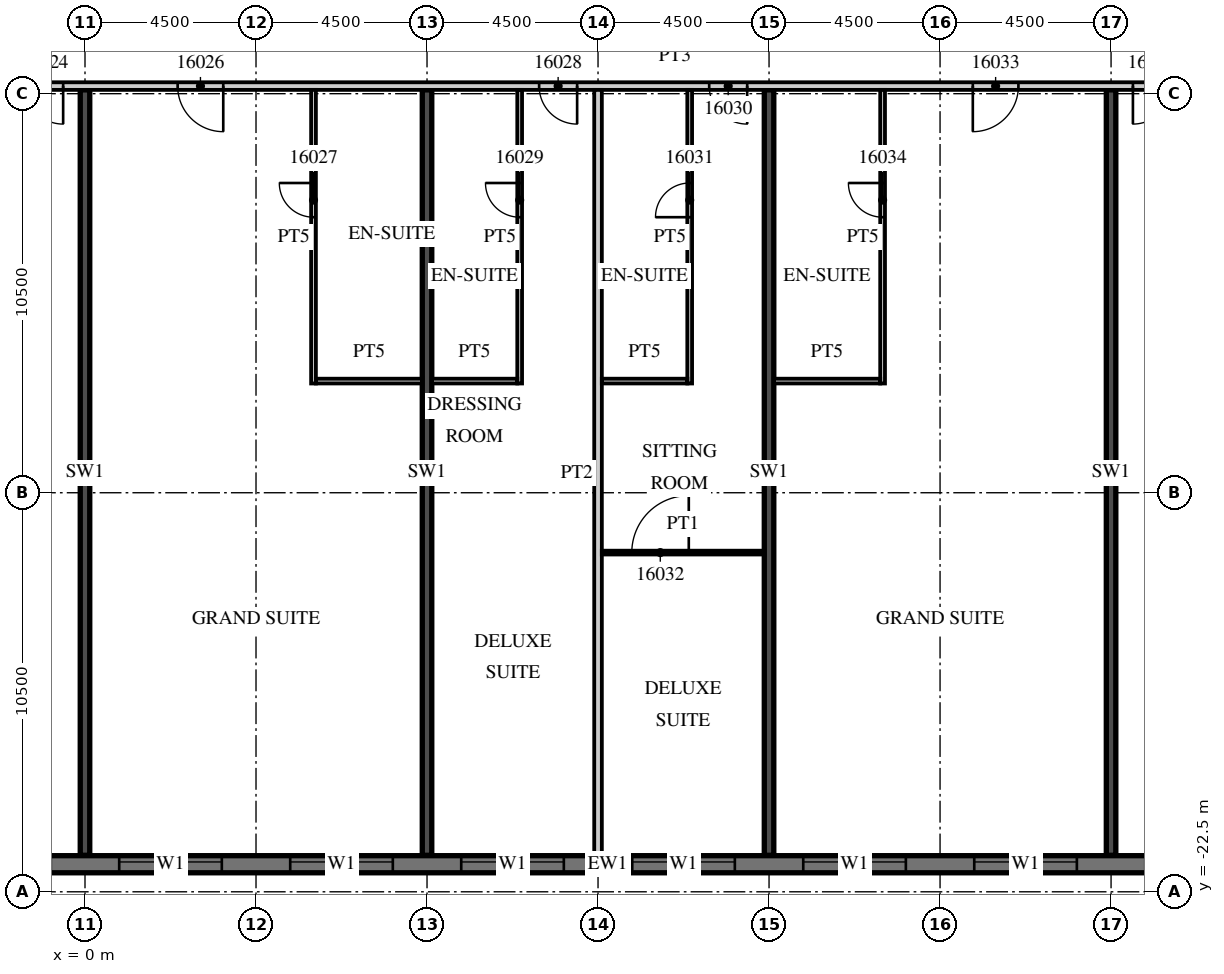
"""IFC4 building model, lengths in metres.
Left out: names, types, materials, properties, quantities, classifications, styles, units other than length and angle.
Written with IfcOpenShell. Run it as: python <this file> out.ifc"""

import sys

from ifc_helpers import new_model, si_unit, direction, frame, frame_2d, origin, place, context, subcontext, project, spatial, rectangle, extrude, element, fill, save


model = new_model("IFC4")
c1 = context("Model", 3, precision=1e-05, world=origin(), true_north=direction((0.0, 1.0)))
c2 = subcontext(c1, "Body", "Model", "MODEL_VIEW")
j1 = project(units=[si_unit("LENGTHUNIT", "METRE"), si_unit("PLANEANGLEUNIT", "RADIAN")], contexts=[c1])
p1 = place(None, origin())
s1 = spatial("IfcSite", under=j1, at=p1, CompositionType="ELEMENT")
p2 = place(p1, origin())
s2 = spatial("IfcBuilding", under=s1, at=p2, CompositionType="ELEMENT")
p3 = place(p2, frame((0.0, 0.0, 83.1)))
s3 = spatial("IfcBuildingStorey", under=s2, at=p3, CompositionType="ELEMENT", Elevation=83.1)
for number, where, z_axis, x_axis in (
    (1, (0.0, -21.54, 0.0), (0.0, 0.0, 1.0), (0.0, 1.0, 0.0)),
    (2, (9.0, -21.54, 0.0), (0.0, 0.0, 1.0), (0.0, 1.0, 0.0)),
    (3, (18.0, -21.54, 0.0), (0.0, 0.0, 1.0), (0.0, 1.0, 0.0)),
    (4, (27.0, -21.54, 0.0), (0.0, 0.0, 1.0), (0.0, 1.0, 0.0)),
):
    element("IfcWall", number, at=place(p3, frame(where, z_axis=z_axis, x_axis=x_axis)), inside=s3, PredefinedType="SHEAR", context=c2, shape_type="SweptSolid", body=[
        extrude(rectangle(XDim=20.14, YDim=0.25, at=frame_2d((10.07, 0.0))), origin(), (0.0, 0.0, 1.0), 3.3),
    ])
p4 = place(p3, frame((-13.5, -21.775, 0.0), z_axis=(0.0, 0.0, 1.0), x_axis=(1.0, 0.0, 0.0)))
e5 = element("IfcWall", 5, at=p4, inside=s3, PredefinedType="SOLIDWALL", context=c2, shape_type="SweptSolid", body=[
    extrude(rectangle(XDim=54.5, YDim=0.45, at=frame_2d((27.25, 0.0))), origin(), (0.0, 0.0, 1.0), 3.02),
])
p5 = place(p4, frame((0.9, 0.0, 0.45)))
e6 = element("IfcOpeningElement", 6, at=p5, cuts=e5, PredefinedType="OPENING", context=c2, shape_type="SweptSolid", body=[
    extrude(rectangle(XDim=2.7, YDim=2.25, at=frame_2d((1.35, 1.125))), frame((0.0, 0.235, 0.0), z_axis=(0.0, -1.0, 0.0), x_axis=(1.0, 0.0, 0.0)), (0.0, 0.0, 1.0), 0.47),
])
p6 = place(p4, frame((5.4, 0.0, 0.45)))
e7 = element("IfcOpeningElement", 7, at=p6, cuts=e5, PredefinedType="OPENING", context=c2, shape_type="SweptSolid", body=[
    extrude(rectangle(XDim=2.7, YDim=2.25, at=frame_2d((1.35, 1.125))), frame((0.0, 0.235, 0.0), z_axis=(0.0, -1.0, 0.0), x_axis=(1.0, 0.0, 0.0)), (0.0, 0.0, 1.0), 0.47),
])
p7 = place(p4, frame((9.9, 0.0, 0.45)))
e8 = element("IfcOpeningElement", 8, at=p7, cuts=e5, PredefinedType="OPENING", context=c2, shape_type="SweptSolid", body=[
    extrude(rectangle(XDim=2.7, YDim=2.25, at=frame_2d((1.35, 1.125))), frame((0.0, 0.235, 0.0), z_axis=(0.0, -1.0, 0.0), x_axis=(1.0, 0.0, 0.0)), (0.0, 0.0, 1.0), 0.47),
])
p8 = place(p4, frame((14.4, 0.0, 0.45)))
e9 = element("IfcOpeningElement", 9, at=p8, cuts=e5, PredefinedType="OPENING", context=c2, shape_type="SweptSolid", body=[
    extrude(rectangle(XDim=2.7, YDim=2.25, at=frame_2d((1.35, 1.125))), frame((0.0, 0.235, 0.0), z_axis=(0.0, -1.0, 0.0), x_axis=(1.0, 0.0, 0.0)), (0.0, 0.0, 1.0), 0.47),
])
p9 = place(p4, frame((18.9, 0.0, 0.45)))
e10 = element("IfcOpeningElement", 10, at=p9, cuts=e5, PredefinedType="OPENING", context=c2, shape_type="SweptSolid", body=[
    extrude(rectangle(XDim=2.7, YDim=2.25, at=frame_2d((1.35, 1.125))), frame((0.0, 0.235, 0.0), z_axis=(0.0, -1.0, 0.0), x_axis=(1.0, 0.0, 0.0)), (0.0, 0.0, 1.0), 0.47),
])
p10 = place(p4, frame((23.4, 0.0, 0.45)))
e11 = element("IfcOpeningElement", 11, at=p10, cuts=e5, PredefinedType="OPENING", context=c2, shape_type="SweptSolid", body=[
    extrude(rectangle(XDim=2.7, YDim=2.25, at=frame_2d((1.35, 1.125))), frame((0.0, 0.235, 0.0), z_axis=(0.0, -1.0, 0.0), x_axis=(1.0, 0.0, 0.0)), (0.0, 0.0, 1.0), 0.47),
])
p11 = place(p4, frame((27.9, 0.0, 0.45)))
e12 = element("IfcOpeningElement", 12, at=p11, cuts=e5, PredefinedType="OPENING", context=c2, shape_type="SweptSolid", body=[
    extrude(rectangle(XDim=2.7, YDim=2.25, at=frame_2d((1.35, 1.125))), frame((0.0, 0.235, 0.0), z_axis=(0.0, -1.0, 0.0), x_axis=(1.0, 0.0, 0.0)), (0.0, 0.0, 1.0), 0.47),
])
p12 = place(p4, frame((32.4, 0.0, 0.45)))
e13 = element("IfcOpeningElement", 13, at=p12, cuts=e5, PredefinedType="OPENING", context=c2, shape_type="SweptSolid", body=[
    extrude(rectangle(XDim=2.7, YDim=2.25, at=frame_2d((1.35, 1.125))), frame((0.0, 0.235, 0.0), z_axis=(0.0, -1.0, 0.0), x_axis=(1.0, 0.0, 0.0)), (0.0, 0.0, 1.0), 0.47),
])
p13 = place(p4, frame((36.9, 0.0, 0.45)))
e14 = element("IfcOpeningElement", 14, at=p13, cuts=e5, PredefinedType="OPENING", context=c2, shape_type="SweptSolid", body=[
    extrude(rectangle(XDim=2.7, YDim=2.25, at=frame_2d((1.35, 1.125))), frame((0.0, 0.235, 0.0), z_axis=(0.0, -1.0, 0.0), x_axis=(1.0, 0.0, 0.0)), (0.0, 0.0, 1.0), 0.47),
])
p14 = place(p4, frame((41.4, 0.0, 0.45)))
e15 = element("IfcOpeningElement", 15, at=p14, cuts=e5, PredefinedType="OPENING", context=c2, shape_type="SweptSolid", body=[
    extrude(rectangle(XDim=2.7, YDim=2.25, at=frame_2d((1.35, 1.125))), frame((0.0, 0.235, 0.0), z_axis=(0.0, -1.0, 0.0), x_axis=(1.0, 0.0, 0.0)), (0.0, 0.0, 1.0), 0.47),
])
p15 = place(p4, frame((45.9, 0.0, 0.45)))
e16 = element("IfcOpeningElement", 16, at=p15, cuts=e5, PredefinedType="OPENING", context=c2, shape_type="SweptSolid", body=[
    extrude(rectangle(XDim=2.7, YDim=2.25, at=frame_2d((1.35, 1.125))), frame((0.0, 0.235, 0.0), z_axis=(0.0, -1.0, 0.0), x_axis=(1.0, 0.0, 0.0)), (0.0, 0.0, 1.0), 0.47),
])
p16 = place(p4, frame((50.4, 0.0, 0.45)))
e17 = element("IfcOpeningElement", 17, at=p16, cuts=e5, PredefinedType="OPENING", context=c2, shape_type="SweptSolid", body=[
    extrude(rectangle(XDim=2.7, YDim=2.25, at=frame_2d((1.35, 1.125))), frame((0.0, 0.235, 0.0), z_axis=(0.0, -1.0, 0.0), x_axis=(1.0, 0.0, 0.0)), (0.0, 0.0, 1.0), 0.47),
])
p17 = place(p3, frame((-13.5, -1.3, 0.0), z_axis=(0.0, 0.0, 1.0), x_axis=(1.0, 0.0, 0.0)))
e18 = element("IfcWall", 18, at=p17, inside=s3, PredefinedType="PARTITIONING", context=c2, shape_type="SweptSolid", body=[
    extrude(rectangle(XDim=58.05, YDim=0.2, at=frame_2d((29.025, 0.0))), origin(), (0.0, 0.0, 1.0), 3.02),
])
p18 = place(p17, frame((2.925, 0.0, 0.0)))
e19 = element("IfcOpeningElement", 19, at=p18, cuts=e18, PredefinedType="OPENING", context=c2, shape_type="SweptSolid", body=[
    extrude(rectangle(XDim=1.0, YDim=2.1, at=frame_2d((0.5, 1.05))), frame((0.0, 0.11, 0.0), z_axis=(0.0, -1.0, 0.0), x_axis=(1.0, 0.0, 0.0)), (0.0, 0.0, 1.0), 0.22),
])
p19 = place(p17, frame((7.45, 0.0, 0.0)))
e20 = element("IfcOpeningElement", 20, at=p19, cuts=e18, PredefinedType="OPENING", context=c2, shape_type="SweptSolid", body=[
    extrude(rectangle(XDim=1.0, YDim=2.1, at=frame_2d((0.5, 1.05))), frame((0.0, 0.11, 0.0), z_axis=(0.0, -1.0, 0.0), x_axis=(1.0, 0.0, 0.0)), (0.0, 0.0, 1.0), 0.22),
])
p20 = place(p17, frame((11.925, 0.0, 0.0)))
e21 = element("IfcOpeningElement", 21, at=p20, cuts=e18, PredefinedType="OPENING", context=c2, shape_type="SweptSolid", body=[
    extrude(rectangle(XDim=1.0, YDim=2.1, at=frame_2d((0.5, 1.05))), frame((0.0, 0.11, 0.0), z_axis=(0.0, -1.0, 0.0), x_axis=(1.0, 0.0, 0.0)), (0.0, 0.0, 1.0), 0.22),
])
p21 = place(p17, frame((15.938, 0.0, 0.0)))
e22 = element("IfcOpeningElement", 22, at=p21, cuts=e18, PredefinedType="OPENING", context=c2, shape_type="SweptSolid", body=[
    extrude(rectangle(XDim=1.2, YDim=2.1, at=frame_2d((0.6, 1.05))), frame((0.0, 0.11, 0.0), z_axis=(0.0, -1.0, 0.0), x_axis=(1.0, 0.0, 0.0)), (0.0, 0.0, 1.0), 0.22),
])
p22 = place(p17, frame((25.45, 0.0, 0.0)))
e23 = element("IfcOpeningElement", 23, at=p22, cuts=e18, PredefinedType="OPENING", context=c2, shape_type="SweptSolid", body=[
    extrude(rectangle(XDim=1.0, YDim=2.1, at=frame_2d((0.5, 1.05))), frame((0.0, 0.11, 0.0), z_axis=(0.0, -1.0, 0.0), x_axis=(1.0, 0.0, 0.0)), (0.0, 0.0, 1.0), 0.22),
])
p23 = place(p17, frame((29.925, 0.0, 0.0)))
e24 = element("IfcOpeningElement", 24, at=p23, cuts=e18, PredefinedType="OPENING", context=c2, shape_type="SweptSolid", body=[
    extrude(rectangle(XDim=1.0, YDim=2.1, at=frame_2d((0.5, 1.05))), frame((0.0, 0.11, 0.0), z_axis=(0.0, -1.0, 0.0), x_axis=(1.0, 0.0, 0.0)), (0.0, 0.0, 1.0), 0.22),
])
p24 = place(p17, frame((36.862, 0.0, 0.0)))
e25 = element("IfcOpeningElement", 25, at=p24, cuts=e18, PredefinedType="OPENING", context=c2, shape_type="SweptSolid", body=[
    extrude(rectangle(XDim=1.2, YDim=2.1, at=frame_2d((0.6, 1.05))), frame((0.0, 0.11, 0.0), z_axis=(0.0, -1.0, 0.0), x_axis=(1.0, 0.0, 0.0)), (0.0, 0.0, 1.0), 0.22),
])
p25 = place(p17, frame((41.075, 0.0, 0.0)))
e26 = element("IfcOpeningElement", 26, at=p25, cuts=e18, PredefinedType="OPENING", context=c2, shape_type="SweptSolid", body=[
    extrude(rectangle(XDim=1.0, YDim=2.1, at=frame_2d((0.5, 1.05))), frame((0.0, 0.11, 0.0), z_axis=(0.0, -1.0, 0.0), x_axis=(1.0, 0.0, 0.0)), (0.0, 0.0, 1.0), 0.22),
])
p26 = place(p17, frame((45.55, 0.0, 0.0)))
e27 = element("IfcOpeningElement", 27, at=p26, cuts=e18, PredefinedType="OPENING", context=c2, shape_type="SweptSolid", body=[
    extrude(rectangle(XDim=1.0, YDim=2.1, at=frame_2d((0.5, 1.05))), frame((0.0, 0.11, 0.0), z_axis=(0.0, -1.0, 0.0), x_axis=(1.0, 0.0, 0.0)), (0.0, 0.0, 1.0), 0.22),
])
p27 = place(p17, frame((52.425, 0.0, 0.0)))
e28 = element("IfcOpeningElement", 28, at=p27, cuts=e18, PredefinedType="OPENING", context=c2, shape_type="SweptSolid", body=[
    extrude(rectangle(XDim=1.0, YDim=2.1, at=frame_2d((0.5, 1.05))), frame((0.0, 0.11, 0.0), z_axis=(0.0, -1.0, 0.0), x_axis=(1.0, 0.0, 0.0)), (0.0, 0.0, 1.0), 0.22),
])
p28 = place(p17, frame((56.525, 0.0, 0.0)))
e29 = element("IfcOpeningElement", 29, at=p28, cuts=e18, PredefinedType="OPENING", context=c2, shape_type="SweptSolid", body=[
    extrude(rectangle(XDim=1.0, YDim=2.1, at=frame_2d((0.5, 1.05))), frame((0.0, 0.11, 0.0), z_axis=(0.0, -1.0, 0.0), x_axis=(1.0, 0.0, 0.0)), (0.0, 0.0, 1.0), 0.22),
])
p29 = place(p3, frame((6.013, -9.125, 0.0), z_axis=(0.0, 0.0, 1.0), x_axis=(0.0, 1.0, 0.0)))
e30 = element("IfcWall", 30, at=p29, inside=s3, PredefinedType="PARTITIONING", context=c2, shape_type="SweptSolid", body=[
    extrude(rectangle(XDim=7.725, YDim=0.125, at=frame_2d((3.863, 0.0))), origin(), (0.0, 0.0, 1.0), 3.02),
])
p30 = place(p29, frame((4.375, 0.0, 0.0)))
e31 = element("IfcOpeningElement", 31, at=p30, cuts=e30, PredefinedType="OPENING", context=c2, shape_type="SweptSolid", body=[
    extrude(rectangle(XDim=0.9, YDim=2.1, at=frame_2d((0.45, 1.05))), frame((0.0, 0.073, 0.0), z_axis=(0.0, -1.0, 0.0), x_axis=(1.0, 0.0, 0.0)), (0.0, 0.0, 1.0), 0.145),
])
p31 = place(p3, frame((6.075, -9.062, 0.0), z_axis=(0.0, 0.0, 1.0), x_axis=(1.0, 0.0, 0.0)))
e32 = element("IfcWall", 32, at=p31, inside=s3, PredefinedType="PARTITIONING", context=c2, shape_type="SweptSolid", body=[
    extrude(rectangle(XDim=2.8, YDim=0.125, at=frame_2d((1.4, 0.0))), origin(), (0.0, 0.0, 1.0), 3.02),
])
p32 = place(p3, frame((13.5, -21.55, 0.0), z_axis=(0.0, 0.0, 1.0), x_axis=(0.0, 1.0, 0.0)))
e33 = element("IfcWall", 33, at=p32, inside=s3, PredefinedType="PARTITIONING", context=c2, shape_type="SweptSolid", body=[
    extrude(rectangle(XDim=20.15, YDim=0.2, at=frame_2d((10.075, 0.0))), origin(), (0.0, 0.0, 1.0), 3.02),
])
p33 = place(p3, frame((11.438, -9.125, 0.0), z_axis=(0.0, 0.0, 1.0), x_axis=(0.0, 1.0, 0.0)))
e34 = element("IfcWall", 34, at=p33, inside=s3, PredefinedType="PARTITIONING", context=c2, shape_type="SweptSolid", body=[
    extrude(rectangle(XDim=7.725, YDim=0.125, at=frame_2d((3.863, 0.0))), origin(), (0.0, 0.0, 1.0), 3.02),
])
p34 = place(p33, frame((4.375, 0.0, 0.0)))
e35 = element("IfcOpeningElement", 35, at=p34, cuts=e34, PredefinedType="OPENING", context=c2, shape_type="SweptSolid", body=[
    extrude(rectangle(XDim=0.9, YDim=2.1, at=frame_2d((0.45, 1.05))), frame((0.0, 0.073, 0.0), z_axis=(0.0, -1.0, 0.0), x_axis=(1.0, 0.0, 0.0)), (0.0, 0.0, 1.0), 0.145),
])
p35 = place(p3, frame((9.125, -9.062, 0.0), z_axis=(0.0, 0.0, 1.0), x_axis=(1.0, 0.0, 0.0)))
e36 = element("IfcWall", 36, at=p35, inside=s3, PredefinedType="PARTITIONING", context=c2, shape_type="SweptSolid", body=[
    extrude(rectangle(XDim=2.25, YDim=0.125, at=frame_2d((1.125, 0.0))), origin(), (0.0, 0.0, 1.0), 3.02),
])
p36 = place(p3, frame((15.912, -9.125, 0.0), z_axis=(0.0, 0.0, 1.0), x_axis=(0.0, 1.0, 0.0)))
e37 = element("IfcWall", 37, at=p36, inside=s3, PredefinedType="PARTITIONING", context=c2, shape_type="SweptSolid", body=[
    extrude(rectangle(XDim=7.725, YDim=0.125, at=frame_2d((3.863, 0.0))), origin(), (0.0, 0.0, 1.0), 3.02),
])
p37 = place(p36, frame((4.375, 0.0, 0.0)))
e38 = element("IfcOpeningElement", 38, at=p37, cuts=e37, PredefinedType="OPENING", context=c2, shape_type="SweptSolid", body=[
    extrude(rectangle(XDim=0.9, YDim=2.1, at=frame_2d((0.45, 1.05))), frame((0.0, 0.073, 0.0), z_axis=(0.0, -1.0, 0.0), x_axis=(1.0, 0.0, 0.0)), (0.0, 0.0, 1.0), 0.145),
])
p38 = place(p3, frame((13.6, -9.062, 0.0), z_axis=(0.0, 0.0, 1.0), x_axis=(1.0, 0.0, 0.0)))
e39 = element("IfcWall", 39, at=p38, inside=s3, PredefinedType="PARTITIONING", context=c2, shape_type="SweptSolid", body=[
    extrude(rectangle(XDim=2.25, YDim=0.125, at=frame_2d((1.125, 0.0))), origin(), (0.0, 0.0, 1.0), 3.02),
])
p39 = place(p3, frame((13.6, -13.575, 0.0), z_axis=(0.0, 0.0, 1.0), x_axis=(1.0, 0.0, 0.0)))
e40 = element("IfcWall", 40, at=p39, inside=s3, PredefinedType="PARTITIONING", context=c2, shape_type="SweptSolid", body=[
    extrude(rectangle(XDim=4.275, YDim=0.1, at=frame_2d((2.137, 0.0))), origin(), (0.0, 0.0, 1.0), 3.02),
])
p40 = place(p39, frame((0.788, 0.0, 0.0)))
e41 = element("IfcOpeningElement", 41, at=p40, cuts=e40, PredefinedType="OPENING", context=c2, shape_type="SweptSolid", body=[
    extrude(rectangle(XDim=1.5, YDim=2.1, at=frame_2d((0.75, 1.05))), frame((0.0, 0.06, 0.0), z_axis=(0.0, -1.0, 0.0), x_axis=(1.0, 0.0, 0.0)), (0.0, 0.0, 1.0), 0.12),
])
p41 = place(p3, frame((20.988, -9.125, 0.0), z_axis=(0.0, 0.0, 1.0), x_axis=(0.0, 1.0, 0.0)))
e42 = element("IfcWall", 42, at=p41, inside=s3, PredefinedType="PARTITIONING", context=c2, shape_type="SweptSolid", body=[
    extrude(rectangle(XDim=7.725, YDim=0.125, at=frame_2d((3.863, 0.0))), origin(), (0.0, 0.0, 1.0), 3.02),
])
p42 = place(p41, frame((4.375, 0.0, 0.0)))
e43 = element("IfcOpeningElement", 43, at=p42, cuts=e42, PredefinedType="OPENING", context=c2, shape_type="SweptSolid", body=[
    extrude(rectangle(XDim=0.9, YDim=2.1, at=frame_2d((0.45, 1.05))), frame((0.0, 0.073, 0.0), z_axis=(0.0, -1.0, 0.0), x_axis=(1.0, 0.0, 0.0)), (0.0, 0.0, 1.0), 0.145),
])
p43 = place(p3, frame((18.125, -9.062, 0.0), z_axis=(0.0, 0.0, 1.0), x_axis=(1.0, 0.0, 0.0)))
e44 = element("IfcWall", 44, at=p43, inside=s3, PredefinedType="PARTITIONING", context=c2, shape_type="SweptSolid", body=[
    extrude(rectangle(XDim=2.8, YDim=0.125, at=frame_2d((1.4, 0.0))), origin(), (0.0, 0.0, 1.0), 3.02),
])
p44 = place(p8, origin())
e45 = element("IfcWindow", 45, at=p44, inside=s3, PartitioningType="SINGLE_PANEL", PredefinedType="WINDOW", context=c2, shape_type="SweptSolid", body=[
    extrude(rectangle(XDim=2.7, YDim=2.25, at=frame_2d((1.35, 1.125))), frame((0.0, 0.09, 0.0), z_axis=(0.0, -1.0, 0.0), x_axis=(1.0, 0.0, 0.0)), (0.0, 0.0, 1.0), 0.06),
])
fill(e9, e45)
p45 = place(p9, origin())
e46 = element("IfcWindow", 46, at=p45, inside=s3, PartitioningType="SINGLE_PANEL", PredefinedType="WINDOW", context=c2, shape_type="SweptSolid", body=[
    extrude(rectangle(XDim=2.7, YDim=2.25, at=frame_2d((1.35, 1.125))), frame((0.0, 0.09, 0.0), z_axis=(0.0, -1.0, 0.0), x_axis=(1.0, 0.0, 0.0)), (0.0, 0.0, 1.0), 0.06),
])
fill(e10, e46)
p46 = place(p10, origin())
e47 = element("IfcWindow", 47, at=p46, inside=s3, PartitioningType="SINGLE_PANEL", PredefinedType="WINDOW", context=c2, shape_type="SweptSolid", body=[
    extrude(rectangle(XDim=2.7, YDim=2.25, at=frame_2d((1.35, 1.125))), frame((0.0, 0.09, 0.0), z_axis=(0.0, -1.0, 0.0), x_axis=(1.0, 0.0, 0.0)), (0.0, 0.0, 1.0), 0.06),
])
fill(e11, e47)
p47 = place(p11, origin())
e48 = element("IfcWindow", 48, at=p47, inside=s3, PartitioningType="SINGLE_PANEL", PredefinedType="WINDOW", context=c2, shape_type="SweptSolid", body=[
    extrude(rectangle(XDim=2.7, YDim=2.25, at=frame_2d((1.35, 1.125))), frame((0.0, 0.09, 0.0), z_axis=(0.0, -1.0, 0.0), x_axis=(1.0, 0.0, 0.0)), (0.0, 0.0, 1.0), 0.06),
])
fill(e12, e48)
p48 = place(p12, origin())
e49 = element("IfcWindow", 49, at=p48, inside=s3, PartitioningType="SINGLE_PANEL", PredefinedType="WINDOW", context=c2, shape_type="SweptSolid", body=[
    extrude(rectangle(XDim=2.7, YDim=2.25, at=frame_2d((1.35, 1.125))), frame((0.0, 0.09, 0.0), z_axis=(0.0, -1.0, 0.0), x_axis=(1.0, 0.0, 0.0)), (0.0, 0.0, 1.0), 0.06),
])
fill(e13, e49)
p49 = place(p13, origin())
e50 = element("IfcWindow", 50, at=p49, inside=s3, PartitioningType="SINGLE_PANEL", PredefinedType="WINDOW", context=c2, shape_type="SweptSolid", body=[
    extrude(rectangle(XDim=2.7, YDim=2.25, at=frame_2d((1.35, 1.125))), frame((0.0, 0.09, 0.0), z_axis=(0.0, -1.0, 0.0), x_axis=(1.0, 0.0, 0.0)), (0.0, 0.0, 1.0), 0.06),
])
fill(e14, e50)
p50 = place(p20, origin())
e51 = element("IfcDoor", 51, at=p50, inside=s3, OperationType="SINGLE_SWING_RIGHT", PredefinedType="DOOR", context=c2, shape_type="SweptSolid", body=[
    extrude(rectangle(XDim=1.0, YDim=2.1, at=frame_2d((0.5, 1.05))), frame((0.0, 0.025, 0.0), z_axis=(0.0, -1.0, 0.0), x_axis=(1.0, 0.0, 0.0)), (0.0, 0.0, 1.0), 0.05),
])
fill(e21, e51)
p51 = place(p21, origin())
e52 = element("IfcDoor", 52, at=p51, inside=s3, OperationType="SINGLE_SWING_RIGHT", PredefinedType="DOOR", context=c2, shape_type="SweptSolid", body=[
    extrude(rectangle(XDim=1.2, YDim=2.1, at=frame_2d((0.6, 1.05))), frame((0.0, 0.025, 0.0), z_axis=(0.0, -1.0, 0.0), x_axis=(1.0, 0.0, 0.0)), (0.0, 0.0, 1.0), 0.05),
])
fill(e22, e52)
p52 = place(p30, origin())
e53 = element("IfcDoor", 53, at=p52, inside=s3, OperationType="SINGLE_SWING_RIGHT", PredefinedType="DOOR", context=c2, shape_type="SweptSolid", body=[
    extrude(rectangle(XDim=0.9, YDim=2.1, at=frame_2d((0.45, 1.05))), frame((0.0, 0.025, 0.0), z_axis=(0.0, -1.0, 0.0), x_axis=(1.0, 0.0, 0.0)), (0.0, 0.0, 1.0), 0.05),
])
fill(e31, e53)
p53 = place(p22, origin())
e54 = element("IfcDoor", 54, at=p53, inside=s3, OperationType="SINGLE_SWING_RIGHT", PredefinedType="DOOR", context=c2, shape_type="SweptSolid", body=[
    extrude(rectangle(XDim=1.0, YDim=2.1, at=frame_2d((0.5, 1.05))), frame((0.0, 0.025, 0.0), z_axis=(0.0, -1.0, 0.0), x_axis=(1.0, 0.0, 0.0)), (0.0, 0.0, 1.0), 0.05),
])
fill(e23, e54)
p54 = place(p34, origin())
e55 = element("IfcDoor", 55, at=p54, inside=s3, OperationType="SINGLE_SWING_RIGHT", PredefinedType="DOOR", context=c2, shape_type="SweptSolid", body=[
    extrude(rectangle(XDim=0.9, YDim=2.1, at=frame_2d((0.45, 1.05))), frame((0.0, 0.025, 0.0), z_axis=(0.0, -1.0, 0.0), x_axis=(1.0, 0.0, 0.0)), (0.0, 0.0, 1.0), 0.05),
])
fill(e35, e55)
p55 = place(p23, origin())
e56 = element("IfcDoor", 56, at=p55, inside=s3, OperationType="SINGLE_SWING_RIGHT", PredefinedType="DOOR", context=c2, shape_type="SweptSolid", body=[
    extrude(rectangle(XDim=1.0, YDim=2.1, at=frame_2d((0.5, 1.05))), frame((0.0, 0.025, 0.0), z_axis=(0.0, -1.0, 0.0), x_axis=(1.0, 0.0, 0.0)), (0.0, 0.0, 1.0), 0.05),
])
fill(e24, e56)
p56 = place(p37, origin())
e57 = element("IfcDoor", 57, at=p56, inside=s3, OperationType="SINGLE_SWING_LEFT", PredefinedType="DOOR", context=c2, shape_type="SweptSolid", body=[
    extrude(rectangle(XDim=0.9, YDim=2.1, at=frame_2d((0.45, 1.05))), frame((0.0, 0.025, 0.0), z_axis=(0.0, -1.0, 0.0), x_axis=(1.0, 0.0, 0.0)), (0.0, 0.0, 1.0), 0.05),
])
fill(e38, e57)
p57 = place(p40, origin())
e58 = element("IfcDoor", 58, at=p57, inside=s3, OperationType="SINGLE_SWING_RIGHT", PredefinedType="DOOR", context=c2, shape_type="SweptSolid", body=[
    extrude(rectangle(XDim=1.5, YDim=2.1, at=frame_2d((0.75, 1.05))), frame((0.0, 0.025, 0.0), z_axis=(0.0, -1.0, 0.0), x_axis=(1.0, 0.0, 0.0)), (0.0, 0.0, 1.0), 0.05),
])
fill(e41, e58)
p58 = place(p24, origin())
e59 = element("IfcDoor", 59, at=p58, inside=s3, OperationType="SINGLE_SWING_LEFT", PredefinedType="DOOR", context=c2, shape_type="SweptSolid", body=[
    extrude(rectangle(XDim=1.2, YDim=2.1, at=frame_2d((0.6, 1.05))), frame((0.0, 0.025, 0.0), z_axis=(0.0, -1.0, 0.0), x_axis=(1.0, 0.0, 0.0)), (0.0, 0.0, 1.0), 0.05),
])
fill(e25, e59)
p59 = place(p42, origin())
e60 = element("IfcDoor", 60, at=p59, inside=s3, OperationType="SINGLE_SWING_RIGHT", PredefinedType="DOOR", context=c2, shape_type="SweptSolid", body=[
    extrude(rectangle(XDim=0.9, YDim=2.1, at=frame_2d((0.45, 1.05))), frame((0.0, 0.025, 0.0), z_axis=(0.0, -1.0, 0.0), x_axis=(1.0, 0.0, 0.0)), (0.0, 0.0, 1.0), 0.05),
])
fill(e43, e60)
p60 = place(p25, origin())
e61 = element("IfcDoor", 61, at=p60, inside=s3, OperationType="SINGLE_SWING_LEFT", PredefinedType="DOOR", context=c2, shape_type="SweptSolid", body=[
    extrude(rectangle(XDim=1.0, YDim=2.1, at=frame_2d((0.5, 1.05))), frame((0.0, 0.025, 0.0), z_axis=(0.0, -1.0, 0.0), x_axis=(1.0, 0.0, 0.0)), (0.0, 0.0, 1.0), 0.05),
])
fill(e26, e61)
save(model, sys.argv[1])
